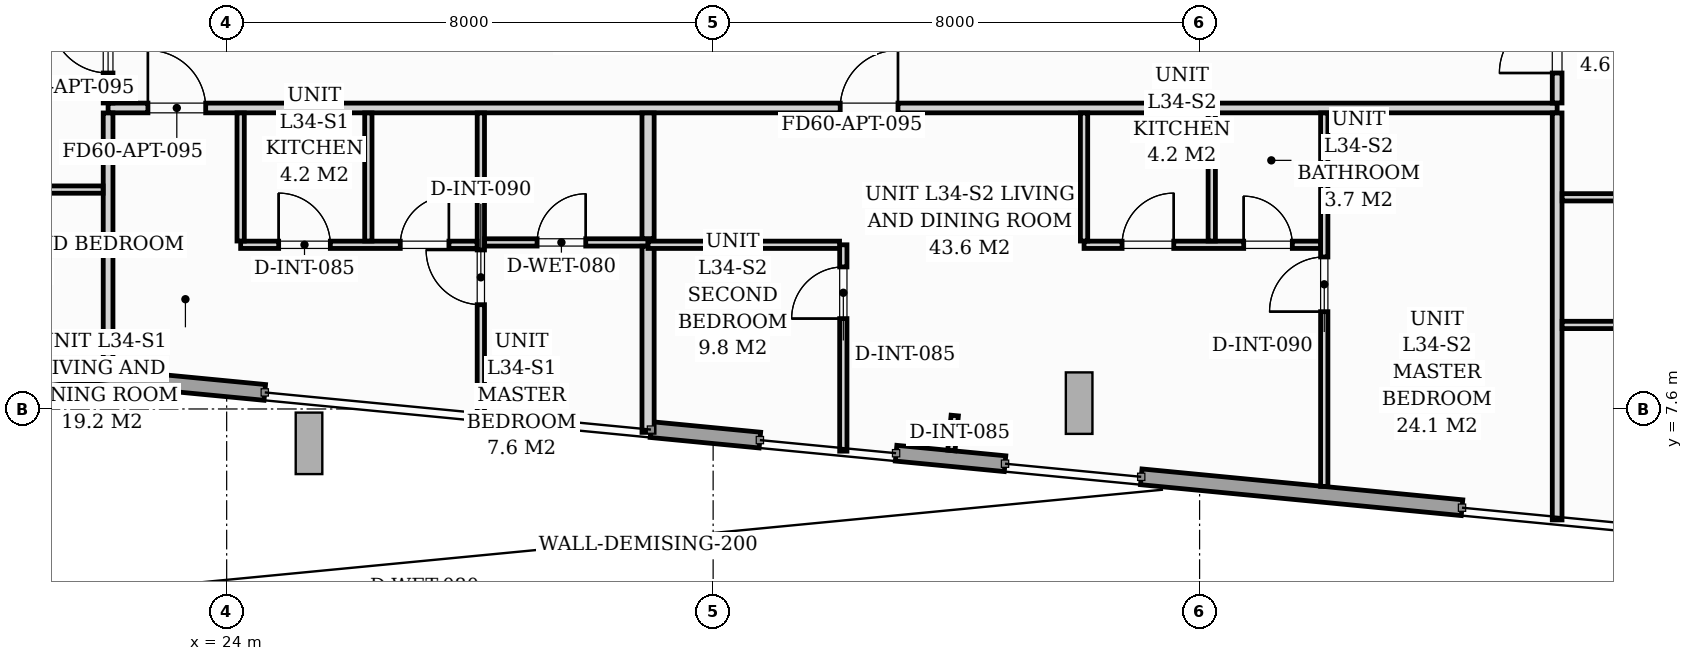
"""IFC4 building model, lengths in metres.
Left out: names, types, materials, properties, quantities, classifications, styles, units other than length and angle.
Written with IfcOpenShell. Run it as: python <this file> out.ifc"""

import sys

from ifc_helpers import new_model, si_unit, direction, frame, frame_2d, origin, origin_2d, place, context, subcontext, project, spatial, rectangle, i_section, extrude, source, transform, mapped, element, fill, save


model = new_model("IFC4")
c1 = context("Model", 3, precision=1e-05, world=origin(), true_north=direction((0.0, 1.0)))
c2 = subcontext(c1, "Body", "Model", "MODEL_VIEW")
j1 = project(units=[si_unit("LENGTHUNIT", "METRE"), si_unit("PLANEANGLEUNIT", "RADIAN")], contexts=[c1])
p1 = place(None, origin())
s1 = spatial("IfcSite", under=j1, at=p1, CompositionType="ELEMENT")
p2 = place(p1, origin())
s2 = spatial("IfcBuilding", under=s1, at=p2, CompositionType="ELEMENT")
p3 = place(p2, frame((0.0, 0.0, 119.4)))
s3 = spatial("IfcBuildingStorey", under=s2, at=p3, CompositionType="ELEMENT", Elevation=119.4)
m1 = source(origin(), c2, "Body", "SweptSolid", [
    extrude(i_section(OverallWidth=0.438, OverallDepth=1.011, WebThickness=0.041, FlangeThickness=0.074, FilletRadius=0.024, at=origin_2d()), origin(), (0.0, 0.0, 1.0), 7.983),
])
p4 = place(p3, frame((26.738, 6.39, 0.195), z_axis=(-0.756952163782, 0.352832496204, 0.55002968226), x_axis=(0.498531518624, -0.232376798124, 0.835145106333)))
e1 = element("IfcColumn", 1, at=p4, inside=s3, PredefinedType="COLUMN", context=c2, shape_type="MappedRepresentation", body=[
    mapped(m1, transform((0.0, 0.0, 0.0), scale=1.0)),
])
m2 = source(origin(), c2, "Body", "SweptSolid", [
    extrude(i_section(OverallWidth=0.438, OverallDepth=1.011, WebThickness=0.041, FlangeThickness=0.074, FilletRadius=0.024, at=origin_2d()), origin(), (0.0, 0.0, 1.0), 8.618),
])
p5 = place(p3, frame((39.707, 7.55, 0.2), z_axis=(-0.858068336627, 0.074333816947, 0.508127162565), x_axis=(0.506231174999, -0.043854427309, 0.861282059876)))
e2 = element("IfcColumn", 2, at=p5, inside=s3, PredefinedType="COLUMN", context=c2, shape_type="MappedRepresentation", body=[
    mapped(m2, transform((0.0, 0.0, 0.0), scale=1.0)),
])
m3 = source(origin(), c2, "Body", "SweptSolid", [
    extrude(i_section(OverallWidth=0.438, OverallDepth=1.011, WebThickness=0.041, FlangeThickness=0.074, FilletRadius=0.024, at=origin_2d()), origin(), (0.0, 0.0, 1.0), 9.879),
])
p6 = place(p3, frame((52.668, 8.704, 0.208), z_axis=(-0.883824382848, -0.154157714467, 0.44168977728), x_axis=(0.435120582334, 0.075894256588, 0.897167844189)))
e3 = element("IfcColumn", 3, at=p6, inside=s3, PredefinedType="COLUMN", context=c2, shape_type="MappedRepresentation", body=[
    mapped(m3, transform((0.0, 0.0, 0.0), scale=1.0)),
])
p7 = place(p3, frame((44.316, 5.977, 0.0), z_axis=(0.0, 0.0, 1.0), x_axis=(-0.995394924002, 0.095858986388, 0.0)))
e4 = element("IfcWall", 4, at=p7, inside=s3, PredefinedType="STANDARD", context=c2, shape_type="SweptSolid", body=[
    extrude(rectangle(XDim=5.3, YDim=0.26, at=frame_2d((2.65, 0.0))), origin(), (0.0, 0.0, 1.0), 4.78),
])
p8 = place(p3, frame((36.8, 6.7, 0.0), z_axis=(0.0, 0.0, 1.0), x_axis=(-0.995403559701, 0.095769271348, 0.0)))
e5 = element("IfcWall", 5, at=p8, inside=s3, PredefinedType="STANDARD", context=c2, shape_type="SweptSolid", body=[
    extrude(rectangle(XDim=1.8, YDim=0.26, at=frame_2d((0.9, 0.0))), origin(), (0.0, 0.0, 1.0), 4.78),
])
p9 = place(p3, frame((32.769, 7.088, 0.0), z_axis=(0.0, 0.0, 1.0), x_axis=(-0.995404803602, 0.095756341646, 0.0)))
e6 = element("IfcWall", 6, at=p9, inside=s3, PredefinedType="STANDARD", context=c2, shape_type="SweptSolid", body=[
    extrude(rectangle(XDim=1.8, YDim=0.26, at=frame_2d((0.9, 0.0))), origin(), (0.0, 0.0, 1.0), 4.78),
])
p10 = place(p3, frame((24.627, 7.872, 0.0), z_axis=(0.0, 0.0, 1.0), x_axis=(-0.995397625271, 0.095830932396, 0.0)))
e7 = element("IfcWall", 7, at=p10, inside=s3, PredefinedType="STANDARD", context=c2, shape_type="SweptSolid", body=[
    extrude(rectangle(XDim=5.22, YDim=0.26, at=frame_2d((2.61, 0.0))), origin(), (0.0, 0.0, 1.0), 4.78),
])
p11 = place(p3, frame((22.05, 12.55, 0.0), z_axis=(0.0, 0.0, 1.0), x_axis=(1.0, 0.0, 0.0)))
e8 = element("IfcWall", 8, at=p11, inside=s3, PredefinedType="PARTITIONING", context=c2, shape_type="SweptSolid", body=[
    extrude(rectangle(XDim=23.83, YDim=0.16, at=frame_2d((11.915, 0.0))), origin(), (0.0, 0.0, 1.0), 4.78),
])
p12 = place(p11, frame((0.655, 0.0, 0.0)))
e9 = element("IfcOpeningElement", 9, at=p12, cuts=e8, PredefinedType="OPENING", context=c2, shape_type="SweptSolid", body=[
    extrude(rectangle(XDim=0.95, YDim=2.06, at=frame_2d((0.475, 1.03))), frame((0.0, 0.09, 0.0), z_axis=(0.0, -1.0, 0.0), x_axis=(1.0, 0.0, 0.0)), (0.0, 0.0, 1.0), 0.18),
])
p13 = place(p11, frame((12.04, 0.0, 0.0)))
e10 = element("IfcOpeningElement", 10, at=p13, cuts=e8, PredefinedType="OPENING", context=c2, shape_type="SweptSolid", body=[
    extrude(rectangle(XDim=0.95, YDim=2.06, at=frame_2d((0.475, 1.03))), frame((0.0, 0.09, 0.0), z_axis=(0.0, -1.0, 0.0), x_axis=(1.0, 0.0, 0.0)), (0.0, 0.0, 1.0), 0.18),
])
p14 = place(p3, frame((22.05, 8.253, 0.0), z_axis=(0.0, 0.0, 1.0), x_axis=(0.0, 1.0, 0.0)))
e11 = element("IfcWall", 11, at=p14, inside=s3, PredefinedType="PARTITIONING", context=c2, shape_type="SweptSolid", body=[
    extrude(rectangle(XDim=4.215, YDim=0.16, at=frame_2d((2.107, 0.0))), origin(), (0.0, 0.0, 1.0), 4.78),
])
p15 = place(p3, frame((22.05, 12.632, 0.0), z_axis=(0.0, 0.0, 1.0), x_axis=(0.0, 1.0, 0.0)))
e12 = element("IfcWall", 12, at=p15, inside=s3, PredefinedType="PARTITIONING", context=c2, shape_type="SweptSolid", body=[
    extrude(rectangle(XDim=14.785, YDim=0.16, at=frame_2d((7.393, 0.0))), origin(), (0.0, 0.0, 1.0), 4.78),
])
p16 = place(p15, frame((0.493, 0.0, 0.0)))
e13 = element("IfcOpeningElement", 13, at=p16, cuts=e12, PredefinedType="OPENING", context=c2, shape_type="SweptSolid", body=[
    extrude(rectangle(XDim=0.95, YDim=2.06, at=frame_2d((0.475, 1.03))), frame((0.0, 0.09, 0.0), z_axis=(0.0, -1.0, 0.0), x_axis=(1.0, 0.0, 0.0)), (0.0, 0.0, 1.0), 0.18),
])
p17 = place(p3, frame((45.88, 5.776, 0.0), z_axis=(0.0, 0.0, 1.0), x_axis=(0.0, 1.0, 0.0)))
e14 = element("IfcWall", 14, at=p17, inside=s3, PredefinedType="PARTITIONING", context=c2, shape_type="SweptSolid", body=[
    extrude(rectangle(XDim=6.692, YDim=0.16, at=frame_2d((3.346, 0.0))), origin(), (0.0, 0.0, 1.0), 4.78),
])
p18 = place(p3, frame((45.88, 12.632, 0.0), z_axis=(0.0, 0.0, 1.0), x_axis=(0.0, 1.0, 0.0)))
e15 = element("IfcWall", 15, at=p18, inside=s3, PredefinedType="PARTITIONING", context=c2, shape_type="SweptSolid", body=[
    extrude(rectangle(XDim=4.466, YDim=0.16, at=frame_2d((2.233, 0.0))), origin(), (0.0, 0.0, 1.0), 4.78),
])
p19 = place(p18, frame((0.493, 0.0, 0.0)))
e16 = element("IfcOpeningElement", 16, at=p19, cuts=e15, PredefinedType="OPENING", context=c2, shape_type="SweptSolid", body=[
    extrude(rectangle(XDim=0.95, YDim=2.06, at=frame_2d((0.475, 1.03))), frame((0.0, 0.09, 0.0), z_axis=(0.0, -1.0, 0.0), x_axis=(1.0, 0.0, 0.0)), (0.0, 0.0, 1.0), 0.18),
])
p20 = place(p3, frame((28.18, 7.48, 0.0), z_axis=(0.0, 0.0, 1.0), x_axis=(0.0, 1.0, 0.0)))
e17 = element("IfcWall", 17, at=p20, inside=s3, PredefinedType="PARTITIONING", context=c2, shape_type="SweptSolid", body=[
    extrude(rectangle(XDim=4.988, YDim=0.12, at=frame_2d((2.494, 0.0))), origin(), (0.0, 0.0, 1.0), 4.78),
])
p21 = place(p20, frame((1.835, 0.0, 0.0)))
e18 = element("IfcOpeningElement", 18, at=p21, cuts=e17, PredefinedType="OPENING", context=c2, shape_type="SweptSolid", body=[
    extrude(rectangle(XDim=0.9, YDim=2.05, at=frame_2d((0.45, 1.025))), frame((0.0, 0.07, 0.0), z_axis=(0.0, -1.0, 0.0), x_axis=(1.0, 0.0, 0.0)), (0.0, 0.0, 1.0), 0.14),
])
p22 = place(p3, frame((24.23, 10.3, 0.0), z_axis=(0.0, 0.0, 1.0), x_axis=(1.0, 0.0, 0.0)))
e19 = element("IfcWall", 19, at=p22, inside=s3, PredefinedType="PARTITIONING", context=c2, shape_type="SweptSolid", body=[
    extrude(rectangle(XDim=3.888, YDim=0.12, at=frame_2d((1.944, 0.0))), origin(), (0.0, 0.0, 1.0), 4.78),
])
p23 = place(p22, frame((0.625, 0.0, 0.0)))
e20 = element("IfcOpeningElement", 20, at=p23, cuts=e19, PredefinedType="OPENING", context=c2, shape_type="SweptSolid", body=[
    extrude(rectangle(XDim=0.85, YDim=2.05, at=frame_2d((0.425, 1.025))), frame((0.0, 0.07, 0.0), z_axis=(0.0, -1.0, 0.0), x_axis=(1.0, 0.0, 0.0)), (0.0, 0.0, 1.0), 0.14),
])
p24 = place(p22, frame((2.625, 0.0, 0.0)))
e21 = element("IfcOpeningElement", 21, at=p24, cuts=e19, PredefinedType="OPENING", context=c2, shape_type="SweptSolid", body=[
    extrude(rectangle(XDim=0.8, YDim=2.02, at=frame_2d((0.4, 1.01))), frame((0.0, 0.07, 0.0), z_axis=(0.0, -1.0, 0.0), x_axis=(1.0, 0.0, 0.0)), (0.0, 0.0, 1.0), 0.14),
])
for number, where, z_axis, x_axis in (
    (22, (26.33, 10.362, 0.0), (0.0, 0.0, 1.0), (0.0, 1.0, 0.0)),
    (23, (24.23, 10.362, 0.0), (0.0, 0.0, 1.0), (0.0, 1.0, 0.0)),
):
    element("IfcWall", number, at=place(p3, frame(where, z_axis=z_axis, x_axis=x_axis)), inside=s3, PredefinedType="PARTITIONING", context=c2, shape_type="SweptSolid", body=[
        extrude(rectangle(XDim=2.106, YDim=0.12, at=frame_2d((1.053, 0.0))), origin(), (0.0, 0.0, 1.0), 4.78),
    ])
p25 = place(p3, frame((28.242, 10.339, 0.0), z_axis=(0.0, 0.0, 1.0), x_axis=(1.0, 0.0, 0.0)))
e24 = element("IfcWall", 24, at=p25, inside=s3, PredefinedType="PARTITIONING", context=c2, shape_type="SweptSolid", body=[
    extrude(rectangle(XDim=2.688, YDim=0.12, at=frame_2d((1.344, 0.0))), origin(), (0.0, 0.0, 1.0), 4.78),
])
p26 = place(p25, frame((0.863, 0.0, 0.0)))
e25 = element("IfcOpeningElement", 25, at=p26, cuts=e24, PredefinedType="OPENING", context=c2, shape_type="SweptSolid", body=[
    extrude(rectangle(XDim=0.8, YDim=2.02, at=frame_2d((0.4, 1.01))), frame((0.0, 0.07, 0.0), z_axis=(0.0, -1.0, 0.0), x_axis=(1.0, 0.0, 0.0)), (0.0, 0.0, 1.0), 0.14),
])
p27 = place(p3, frame((30.93, 7.215, 0.0), z_axis=(0.0, 0.0, 1.0), x_axis=(0.0, 1.0, 0.0)))
e26 = element("IfcWall", 26, at=p27, inside=s3, PredefinedType="PARTITIONING", context=c2, shape_type="SweptSolid", body=[
    extrude(rectangle(XDim=3.062, YDim=0.2, at=frame_2d((1.531, 0.0))), origin(), (0.0, 0.0, 1.0), 4.78),
])
p28 = place(p3, frame((30.93, 10.401, 0.0), z_axis=(0.0, 0.0, 1.0), x_axis=(0.0, 1.0, 0.0)))
e27 = element("IfcWall", 27, at=p28, inside=s3, PredefinedType="PARTITIONING", context=c2, shape_type="SweptSolid", body=[
    extrude(rectangle(XDim=2.067, YDim=0.2, at=frame_2d((1.034, 0.0))), origin(), (0.0, 0.0, 1.0), 4.78),
])
p29 = place(p3, frame((42.05, 6.327, 0.0), z_axis=(0.0, 0.0, 1.0), x_axis=(0.0, 1.0, 0.0)))
e28 = element("IfcWall", 28, at=p29, inside=s3, PredefinedType="PARTITIONING", context=c2, shape_type="SweptSolid", body=[
    extrude(rectangle(XDim=6.141, YDim=0.12, at=frame_2d((3.07, 0.0))), origin(), (0.0, 0.0, 1.0), 4.78),
])
p30 = place(p29, frame((2.873, 0.0, 0.0)))
e29 = element("IfcOpeningElement", 29, at=p30, cuts=e28, PredefinedType="OPENING", context=c2, shape_type="SweptSolid", body=[
    extrude(rectangle(XDim=0.9, YDim=2.05, at=frame_2d((0.45, 1.025))), frame((0.0, 0.07, 0.0), z_axis=(0.0, -1.0, 0.0), x_axis=(1.0, 0.0, 0.0)), (0.0, 0.0, 1.0), 0.14),
])
p31 = place(p3, frame((38.1, 10.3, 0.0), z_axis=(0.0, 0.0, 1.0), x_axis=(1.0, 0.0, 0.0)))
e30 = element("IfcWall", 30, at=p31, inside=s3, PredefinedType="PARTITIONING", context=c2, shape_type="SweptSolid", body=[
    extrude(rectangle(XDim=3.888, YDim=0.12, at=frame_2d((1.944, 0.0))), origin(), (0.0, 0.0, 1.0), 4.78),
])
p32 = place(p31, frame((0.625, 0.0, 0.0)))
e31 = element("IfcOpeningElement", 31, at=p32, cuts=e30, PredefinedType="OPENING", context=c2, shape_type="SweptSolid", body=[
    extrude(rectangle(XDim=0.85, YDim=2.05, at=frame_2d((0.425, 1.025))), frame((0.0, 0.07, 0.0), z_axis=(0.0, -1.0, 0.0), x_axis=(1.0, 0.0, 0.0)), (0.0, 0.0, 1.0), 0.14),
])
p33 = place(p31, frame((2.625, 0.0, 0.0)))
e32 = element("IfcOpeningElement", 32, at=p33, cuts=e30, PredefinedType="OPENING", context=c2, shape_type="SweptSolid", body=[
    extrude(rectangle(XDim=0.8, YDim=2.02, at=frame_2d((0.4, 1.01))), frame((0.0, 0.07, 0.0), z_axis=(0.0, -1.0, 0.0), x_axis=(1.0, 0.0, 0.0)), (0.0, 0.0, 1.0), 0.14),
])
for number, where, z_axis, x_axis in (
    (33, (40.2, 10.362, 0.0), (0.0, 0.0, 1.0), (0.0, 1.0, 0.0)),
    (34, (38.1, 10.362, 0.0), (0.0, 0.0, 1.0), (0.0, 1.0, 0.0)),
):
    element("IfcWall", number, at=place(p3, frame(where, z_axis=z_axis, x_axis=x_axis)), inside=s3, PredefinedType="PARTITIONING", context=c2, shape_type="SweptSolid", body=[
        extrude(rectangle(XDim=2.106, YDim=0.12, at=frame_2d((1.053, 0.0))), origin(), (0.0, 0.0, 1.0), 4.78),
    ])
p34 = place(p3, frame((34.141, 6.906, 0.0), z_axis=(0.0, 0.0, 1.0), x_axis=(0.0, 1.0, 0.0)))
e35 = element("IfcWall", 35, at=p34, inside=s3, PredefinedType="PARTITIONING", context=c2, shape_type="SweptSolid", body=[
    extrude(rectangle(XDim=3.394, YDim=0.12, at=frame_2d((1.697, 0.0))), origin(), (0.0, 0.0, 1.0), 4.78),
])
p35 = place(p34, frame((2.18, 0.0, 0.0)))
e36 = element("IfcOpeningElement", 36, at=p35, cuts=e35, PredefinedType="OPENING", context=c2, shape_type="SweptSolid", body=[
    extrude(rectangle(XDim=0.85, YDim=2.05, at=frame_2d((0.425, 1.025))), frame((0.0, 0.07, 0.0), z_axis=(0.0, -1.0, 0.0), x_axis=(1.0, 0.0, 0.0)), (0.0, 0.0, 1.0), 0.14),
])
p36 = place(p3, frame((30.93, 10.3, 0.0), z_axis=(0.0, 0.0, 1.0), x_axis=(1.0, 0.0, 0.0)))
e37 = element("IfcWall", 37, at=p36, inside=s3, PredefinedType="PARTITIONING", context=c2, shape_type="SweptSolid", body=[
    extrude(rectangle(XDim=3.149, YDim=0.12, at=frame_2d((1.575, 0.0))), origin(), (0.0, 0.0, 1.0), 4.78),
])
p37 = place(p3, frame((6.857, 11.208, 0.0), z_axis=(0.0, 0.0, 1.0), x_axis=(1.0, 0.0, 0.0)))
e38 = element("IfcWall", 38, at=p37, inside=s3, PredefinedType="PARTITIONING", context=c2, shape_type="SweptSolid", body=[
    extrude(rectangle(XDim=15.111, YDim=0.12, at=frame_2d((7.556, 0.0))), origin(), (0.0, 0.0, 1.0), 4.78),
])
p38 = place(p37, frame((7.01, 0.0, 0.0)))
e39 = element("IfcOpeningElement", 39, at=p38, cuts=e38, PredefinedType="OPENING", context=c2, shape_type="SweptSolid", body=[
    extrude(rectangle(XDim=0.85, YDim=2.05, at=frame_2d((0.425, 1.025))), frame((0.0, 0.07, 0.0), z_axis=(0.0, -1.0, 0.0), x_axis=(1.0, 0.0, 0.0)), (0.0, 0.0, 1.0), 0.14),
])
p39 = place(p3, frame((45.962, 8.982, 0.0), z_axis=(0.0, 0.0, 1.0), x_axis=(1.0, 0.0, 0.0)))
e40 = element("IfcWall", 40, at=p39, inside=s3, PredefinedType="PARTITIONING", context=c2, shape_type="SweptSolid", body=[
    extrude(rectangle(XDim=12.746, YDim=0.12, at=frame_2d((6.373, 0.0))), origin(), (0.0, 0.0, 1.0), 4.78),
])
p40 = place(p39, frame((8.02, 0.0, 0.0)))
e41 = element("IfcOpeningElement", 41, at=p40, cuts=e40, PredefinedType="OPENING", context=c2, shape_type="SweptSolid", body=[
    extrude(rectangle(XDim=0.85, YDim=2.05, at=frame_2d((0.425, 1.025))), frame((0.0, 0.07, 0.0), z_axis=(0.0, -1.0, 0.0), x_axis=(1.0, 0.0, 0.0)), (0.0, 0.0, 1.0), 0.14),
])
p41 = place(p3, frame((45.962, 11.081, 0.0), z_axis=(0.0, 0.0, 1.0), x_axis=(1.0, 0.0, 0.0)))
e42 = element("IfcWall", 42, at=p41, inside=s3, PredefinedType="PARTITIONING", context=c2, shape_type="SweptSolid", body=[
    extrude(rectangle(XDim=12.948, YDim=0.12, at=frame_2d((6.474, 0.0))), origin(), (0.0, 0.0, 1.0), 4.78),
])
p42 = place(p41, frame((6.147, 0.0, 0.0)))
e43 = element("IfcOpeningElement", 43, at=p42, cuts=e42, PredefinedType="OPENING", context=c2, shape_type="SweptSolid", body=[
    extrude(rectangle(XDim=0.85, YDim=2.05, at=frame_2d((0.425, 1.025))), frame((0.0, 0.07, 0.0), z_axis=(0.0, -1.0, 0.0), x_axis=(1.0, 0.0, 0.0)), (0.0, 0.0, 1.0), 0.14),
])
p43 = place(p3, frame((35.973, 7.492, 0.0), z_axis=(0.0, 0.0, 1.0), x_axis=(-0.095647892029, -0.995415230319, 0.0)))
e44 = element("IfcWall", 44, at=p43, inside=s3, PredefinedType="PARTITIONING", context=c2, shape_type="SweptSolid", body=[
    extrude(rectangle(XDim=0.577, YDim=0.12, at=frame_2d((0.289, 0.0))), origin(), (0.0, 0.0, 1.0), 4.78),
])
m4 = source(origin(), c2, "Body", "SweptSolid", [
    extrude(rectangle(XDim=0.8, YDim=2.02, at=frame_2d((0.4, 1.01))), frame((0.0, 0.025, 0.0), z_axis=(0.0, -1.0, 0.0), x_axis=(1.0, 0.0, 0.0)), (0.0, 0.0, 1.0), 0.05),
])
p44 = place(p26, origin())
e45 = element("IfcDoor", 45, at=p44, inside=s3, OperationType="SINGLE_SWING_RIGHT", PredefinedType="DOOR", context=c2, shape_type="MappedRepresentation", body=[
    mapped(m4, transform((0.0, 0.0, 0.0), scale=1.0)),
])
fill(e25, e45)
m5 = source(origin(), c2, "Body", "SweptSolid", [
    extrude(rectangle(XDim=0.95, YDim=2.06, at=frame_2d((0.475, 1.03))), frame((0.0, 0.025, 0.0), z_axis=(0.0, -1.0, 0.0), x_axis=(1.0, 0.0, 0.0)), (0.0, 0.0, 1.0), 0.05),
])
p45 = place(p12, origin())
e46 = element("IfcDoor", 46, at=p45, inside=s3, OperationType="SINGLE_SWING_LEFT", PredefinedType="DOOR", context=c2, shape_type="MappedRepresentation", body=[
    mapped(m5, transform((0.0, 0.0, 0.0), scale=1.0)),
])
fill(e9, e46)
m6 = source(origin(), c2, "Body", "SweptSolid", [
    extrude(rectangle(XDim=0.9, YDim=2.05, at=frame_2d((0.45, 1.025))), frame((0.0, 0.025, 0.0), z_axis=(0.0, -1.0, 0.0), x_axis=(1.0, 0.0, 0.0)), (0.0, 0.0, 1.0), 0.05),
])
p46 = place(p21, origin())
e47 = element("IfcDoor", 47, at=p46, inside=s3, OperationType="SINGLE_SWING_RIGHT", PredefinedType="DOOR", context=c2, shape_type="MappedRepresentation", body=[
    mapped(m6, transform((0.0, 0.0, 0.0), scale=1.0)),
])
fill(e18, e47)
m7 = source(origin(), c2, "Body", "SweptSolid", [
    extrude(rectangle(XDim=0.85, YDim=2.05, at=frame_2d((0.425, 1.025))), frame((0.0, 0.025, 0.0), z_axis=(0.0, -1.0, 0.0), x_axis=(1.0, 0.0, 0.0)), (0.0, 0.0, 1.0), 0.05),
])
p47 = place(p23, origin())
e48 = element("IfcDoor", 48, at=p47, inside=s3, OperationType="SINGLE_SWING_LEFT", PredefinedType="DOOR", context=c2, shape_type="MappedRepresentation", body=[
    mapped(m7, transform((0.0, 0.0, 0.0), scale=1.0)),
])
fill(e20, e48)
p48 = place(p24, origin())
e49 = element("IfcDoor", 49, at=p48, inside=s3, OperationType="SINGLE_SWING_RIGHT", PredefinedType="DOOR", context=c2, shape_type="MappedRepresentation", body=[
    mapped(m4, transform((0.0, 0.0, 0.0), scale=1.0)),
])
fill(e21, e49)
p49 = place(p35, origin())
e50 = element("IfcDoor", 50, at=p49, inside=s3, OperationType="SINGLE_SWING_LEFT", PredefinedType="DOOR", context=c2, shape_type="MappedRepresentation", body=[
    mapped(m7, transform((0.0, 0.0, 0.0), scale=1.0)),
])
fill(e36, e50)
p50 = place(p13, origin())
e51 = element("IfcDoor", 51, at=p50, inside=s3, OperationType="SINGLE_SWING_RIGHT", PredefinedType="DOOR", context=c2, shape_type="MappedRepresentation", body=[
    mapped(m5, transform((0.0, 0.0, 0.0), scale=1.0)),
])
fill(e10, e51)
p51 = place(p30, origin())
e52 = element("IfcDoor", 52, at=p51, inside=s3, OperationType="SINGLE_SWING_LEFT", PredefinedType="DOOR", context=c2, shape_type="MappedRepresentation", body=[
    mapped(m6, transform((0.0, 0.0, 0.0), scale=1.0)),
])
fill(e29, e52)
p52 = place(p32, origin())
e53 = element("IfcDoor", 53, at=p52, inside=s3, OperationType="SINGLE_SWING_RIGHT", PredefinedType="DOOR", context=c2, shape_type="MappedRepresentation", body=[
    mapped(m7, transform((0.0, 0.0, 0.0), scale=1.0)),
])
fill(e31, e53)
p53 = place(p33, origin())
e54 = element("IfcDoor", 54, at=p53, inside=s3, OperationType="SINGLE_SWING_LEFT", PredefinedType="DOOR", context=c2, shape_type="MappedRepresentation", body=[
    mapped(m4, transform((0.0, 0.0, 0.0), scale=1.0)),
])
fill(e32, e54)
p54 = place(p16, origin())
e55 = element("IfcDoor", 55, at=p54, inside=s3, OperationType="SINGLE_SWING_RIGHT", PredefinedType="DOOR", context=c2, shape_type="MappedRepresentation", body=[
    mapped(m5, transform((0.0, 0.0, 0.0), scale=1.0)),
])
fill(e13, e55)
p55 = place(p19, origin())
e56 = element("IfcDoor", 56, at=p55, inside=s3, OperationType="SINGLE_SWING_LEFT", PredefinedType="DOOR", context=c2, shape_type="MappedRepresentation", body=[
    mapped(m5, transform((0.0, 0.0, 0.0), scale=1.0)),
])
fill(e16, e56)
save(model, sys.argv[1])
